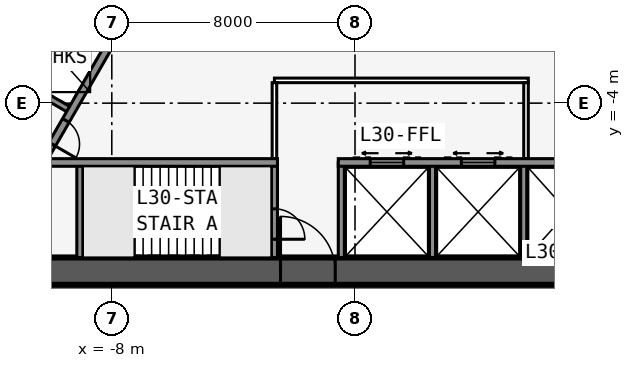
"""IFC4 building model, lengths in metres.
Left out: names, types, materials, properties, quantities, classifications, styles, units other than length and angle.
Written with IfcOpenShell. Run it as: python <this file> out.ifc"""

import sys

from ifc_helpers import new_model, si_unit, direction, frame, frame_2d, origin, place, context, subcontext, project, spatial, rectangle, extrude, element, fill, save


model = new_model("IFC4")
c1 = context("Model", 3, precision=1e-05, world=origin(), true_north=direction((0.0, 1.0)))
c2 = subcontext(c1, "Body", "Model", "MODEL_VIEW")
j1 = project(units=[si_unit("LENGTHUNIT", "METRE"), si_unit("PLANEANGLEUNIT", "RADIAN")], contexts=[c1])
p1 = place(None, origin())
s1 = spatial("IfcSite", under=j1, at=p1, CompositionType="ELEMENT")
p2 = place(p1, origin())
s2 = spatial("IfcBuilding", under=s1, at=p2, CompositionType="ELEMENT")
p3 = place(p2, frame((0.0, 0.0, 118.1)))
s3 = spatial("IfcBuildingStorey", under=s2, at=p3, CompositionType="ELEMENT", Elevation=118.1)
p4 = place(p3, frame((-16.5, -9.526, 0.0), z_axis=(0.0, 0.0, 1.0), x_axis=(1.0, 0.0, 0.0)))
e1 = element("IfcWall", 1, at=p4, inside=s3, PredefinedType="SHEAR", context=c2, shape_type="SweptSolid", body=[
    extrude(rectangle(XDim=33.0, YDim=0.9, at=frame_2d((16.5, 0.0))), origin(), (0.0, 0.0, 1.0), 3.4),
])
p5 = place(p4, frame((14.05, 0.0, 0.0)))
e2 = element("IfcOpeningElement", 2, at=p5, cuts=e1, PredefinedType="OPENING", context=c2, shape_type="SweptSolid", body=[
    extrude(rectangle(XDim=1.8, YDim=2.13, at=frame_2d((0.9, 1.065))), frame((0.0, 0.46, 0.0), z_axis=(0.0, -1.0, 0.0), x_axis=(1.0, 0.0, 0.0)), (0.0, 0.0, 1.0), 0.92),
])
p6 = place(p3, frame((-10.183, -5.951, 0.0), z_axis=(0.0, 0.0, 1.0), x_axis=(1.0, 0.0, 0.0)))
e3 = element("IfcWall", 3, at=p6, inside=s3, PredefinedType="SOLIDWALL", context=c2, shape_type="SweptSolid", body=[
    extrude(rectangle(XDim=7.633, YDim=0.25, at=frame_2d((3.816, 0.0))), origin(), (0.0, 0.0, 1.0), 3.235),
])
p7 = place(p3, frame((-0.55, -5.951, 0.0), z_axis=(0.0, 0.0, 1.0), x_axis=(1.0, 0.0, 0.0)))
e4 = element("IfcWall", 4, at=p7, inside=s3, PredefinedType="SOLIDWALL", context=c2, shape_type="SweptSolid", body=[
    extrude(rectangle(XDim=10.733, YDim=0.25, at=frame_2d((5.366, 0.0))), origin(), (0.0, 0.0, 1.0), 3.235),
])
p8 = place(p7, frame((9.314, 0.0, 0.0)))
e5 = element("IfcOpeningElement", 5, at=p8, cuts=e4, PredefinedType="OPENING", context=c2, shape_type="SweptSolid", body=[
    extrude(rectangle(XDim=0.9, YDim=2.13, at=frame_2d((0.45, 1.065))), frame((0.0, 0.135, 0.0), z_axis=(0.0, -1.0, 0.0), x_axis=(1.0, 0.0, 0.0)), (0.0, 0.0, 1.0), 0.27),
])
p9 = place(p7, frame((1.05, 0.0, 0.0)))
e6 = element("IfcOpeningElement", 6, at=p9, cuts=e4, PredefinedType="OPENING", context=c2, shape_type="SweptSolid", body=[
    extrude(rectangle(XDim=1.1, YDim=2.13, at=frame_2d((0.55, 1.065))), frame((0.0, 0.135, 0.0), z_axis=(0.0, -1.0, 0.0), x_axis=(1.0, 0.0, 0.0)), (0.0, 0.0, 1.0), 0.27),
])
p10 = place(p7, frame((4.05, 0.0, 0.0)))
e7 = element("IfcOpeningElement", 7, at=p10, cuts=e4, PredefinedType="OPENING", context=c2, shape_type="SweptSolid", body=[
    extrude(rectangle(XDim=1.1, YDim=2.13, at=frame_2d((0.55, 1.065))), frame((0.0, 0.135, 0.0), z_axis=(0.0, -1.0, 0.0), x_axis=(1.0, 0.0, 0.0)), (0.0, 0.0, 1.0), 0.27),
])
p11 = place(p3, frame((-9.05, -5.951, 0.0), z_axis=(0.0, 0.0, 1.0), x_axis=(0.0, -1.0, 0.0)))
e8 = element("IfcWall", 8, at=p11, inside=s3, PredefinedType="SOLIDWALL", context=c2, shape_type="SweptSolid", body=[
    extrude(rectangle(XDim=3.125, YDim=0.2, at=frame_2d((1.562, 0.0))), origin(), (0.0, 0.0, 1.0), 3.235),
])
p12 = place(p3, frame((-2.65, -5.951, 0.0), z_axis=(0.0, 0.0, 1.0), x_axis=(0.0, -1.0, 0.0)))
e9 = element("IfcWall", 9, at=p12, inside=s3, PredefinedType="SOLIDWALL", context=c2, shape_type="SweptSolid", body=[
    extrude(rectangle(XDim=3.125, YDim=0.2, at=frame_2d((1.562, 0.0))), origin(), (0.0, 0.0, 1.0), 3.235),
])
p13 = place(p12, frame((1.525, 0.0, 0.0)))
e10 = element("IfcOpeningElement", 10, at=p13, cuts=e9, PredefinedType="OPENING", context=c2, shape_type="SweptSolid", body=[
    extrude(rectangle(XDim=1.0, YDim=2.13, at=frame_2d((0.5, 1.065))), frame((0.0, 0.11, 0.0), z_axis=(0.0, -1.0, 0.0), x_axis=(1.0, 0.0, 0.0)), (0.0, 0.0, 1.0), 0.22),
])
for number, where, z_axis, x_axis in (
    (11, (-0.45, -5.951, 0.0), (0.0, 0.0, 1.0), (0.0, -1.0, 0.0)),
    (12, (2.55, -5.951, 0.0), (0.0, 0.0, 1.0), (0.0, -1.0, 0.0)),
    (13, (5.55, -5.951, 0.0), (0.0, 0.0, 1.0), (0.0, -1.0, 0.0)),
):
    element("IfcWall", number, at=place(p3, frame(where, z_axis=z_axis, x_axis=x_axis)), inside=s3, PredefinedType="SOLIDWALL", context=c2, shape_type="SweptSolid", body=[
        extrude(rectangle(XDim=3.125, YDim=0.2, at=frame_2d((1.562, 0.0))), origin(), (0.0, 0.0, 1.0), 3.235),
    ])
p14 = place(p3, frame((16.5, -9.526, 0.0), z_axis=(0.0, 0.0, 1.0), x_axis=(-0.499999749417, 0.866025548458, 0.0)))
e14 = element("IfcWall", 14, at=p14, inside=s3, PredefinedType="SHEAR", context=c2, shape_type="SweptSolid", body=[
    extrude(rectangle(XDim=33.0, YDim=0.9, at=frame_2d((16.5, 0.0))), origin(), (0.0, 0.0, 1.0), 3.4),
])
p15 = place(p14, frame((14.15, 0.0, 0.0)))
e15 = element("IfcOpeningElement", 15, at=p15, cuts=e14, PredefinedType="OPENING", context=c2, shape_type="SweptSolid", body=[
    extrude(rectangle(XDim=1.8, YDim=2.13, at=frame_2d((0.9, 1.065))), frame((0.0, 0.46, 0.0), z_axis=(0.0, -1.0, 0.0), x_axis=(1.0, 0.0, 0.0)), (0.0, 0.0, 1.0), 0.92),
])
p16 = place(p14, frame((12.6, 0.0, 0.0)))
e16 = element("IfcOpeningElement", 16, at=p16, cuts=e14, PredefinedType="OPENING", context=c2, shape_type="SweptSolid", body=[
    extrude(rectangle(XDim=1.0, YDim=2.13, at=frame_2d((0.5, 1.065))), frame((0.0, 0.46, 0.0), z_axis=(0.0, -1.0, 0.0), x_axis=(1.0, 0.0, 0.0)), (0.0, 0.0, 1.0), 0.92),
])
p17 = place(p3, frame((10.245, -5.843, 0.0), z_axis=(0.0, 0.0, 1.0), x_axis=(-0.499993009313, 0.866029439822, 0.0)))
e17 = element("IfcWall", 17, at=p17, inside=s3, PredefinedType="SOLIDWALL", context=c2, shape_type="SweptSolid", body=[
    extrude(rectangle(XDim=7.733, YDim=0.25, at=frame_2d((3.866, 0.0))), origin(), (0.0, 0.0, 1.0), 3.235),
])
p18 = place(p3, frame((0.0, 19.052, 0.0), z_axis=(0.0, 0.0, 1.0), x_axis=(-0.499999749417, -0.866025548458, 0.0)))
e18 = element("IfcWall", 18, at=p18, inside=s3, PredefinedType="SHEAR", context=c2, shape_type="SweptSolid", body=[
    extrude(rectangle(XDim=33.0, YDim=0.9, at=frame_2d((16.5, 0.0))), origin(), (0.0, 0.0, 1.0), 3.4),
])
p19 = place(p18, frame((14.15, 0.0, 0.0)))
e19 = element("IfcOpeningElement", 19, at=p19, cuts=e18, PredefinedType="OPENING", context=c2, shape_type="SweptSolid", body=[
    extrude(rectangle(XDim=1.8, YDim=2.13, at=frame_2d((0.9, 1.065))), frame((0.0, 0.46, 0.0), z_axis=(0.0, -1.0, 0.0), x_axis=(1.0, 0.0, 0.0)), (0.0, 0.0, 1.0), 0.92),
])
p20 = place(p18, frame((12.6, 0.0, 0.0)))
e20 = element("IfcOpeningElement", 20, at=p20, cuts=e18, PredefinedType="OPENING", context=c2, shape_type="SweptSolid", body=[
    extrude(rectangle(XDim=1.0, YDim=2.13, at=frame_2d((0.5, 1.065))), frame((0.0, 0.46, 0.0), z_axis=(0.0, -1.0, 0.0), x_axis=(1.0, 0.0, 0.0)), (0.0, 0.0, 1.0), 0.92),
])
p21 = place(p3, frame((-4.929, 3.365, 0.0), z_axis=(0.0, 0.0, 1.0), x_axis=(-0.499991433582, -0.866030349552, 0.0)))
e21 = element("IfcWall", 21, at=p21, inside=s3, PredefinedType="SOLIDWALL", context=c2, shape_type="SweptSolid", body=[
    extrude(rectangle(XDim=10.633, YDim=0.25, at=frame_2d((5.316, 0.0))), origin(), (0.0, 0.0, 1.0), 3.235),
])
p22 = place(p21, frame((9.164, 0.0, 0.0)))
e22 = element("IfcOpeningElement", 22, at=p22, cuts=e21, PredefinedType="OPENING", context=c2, shape_type="SweptSolid", body=[
    extrude(rectangle(XDim=0.9, YDim=2.13, at=frame_2d((0.45, 1.065))), frame((0.0, 0.135, 0.0), z_axis=(0.0, -1.0, 0.0), x_axis=(1.0, 0.0, 0.0)), (0.0, 0.0, 1.0), 0.27),
])
p23 = place(p3, frame((-9.329, -4.256, 0.0), z_axis=(0.0, 0.0, 1.0), x_axis=(-0.866022959057, 0.500004234368, 0.0)))
e23 = element("IfcWall", 23, at=p23, inside=s3, PredefinedType="SOLIDWALL", context=c2, shape_type="SweptSolid", body=[
    extrude(rectangle(XDim=3.125, YDim=0.2, at=frame_2d((1.562, 0.0))), origin(), (0.0, 0.0, 1.0), 3.235),
])
p24 = place(p3, frame((20.027, -10.985, 0.0), z_axis=(0.0, 0.0, 1.0), x_axis=(-0.500001677587, 0.866024435227, 0.0)))
e24 = element("IfcWall", 24, at=p24, inside=s3, PredefinedType="PARTITIONING", context=c2, shape_type="SweptSolid", body=[
    extrude(rectangle(XDim=39.054, YDim=0.15, at=frame_2d((19.527, 0.0))), origin(), (0.0, 0.0, 1.0), 3.235),
])
p25 = place(p24, frame((0.352, 0.0, 0.0)))
e25 = element("IfcOpeningElement", 25, at=p25, cuts=e24, PredefinedType="OPENING", context=c2, shape_type="SweptSolid", body=[
    extrude(rectangle(XDim=0.95, YDim=2.13, at=frame_2d((0.475, 1.065))), frame((0.0, 0.085, 0.0), z_axis=(0.0, -1.0, 0.0), x_axis=(1.0, 0.0, 0.0)), (0.0, 0.0, 1.0), 0.17),
])
p26 = place(p24, frame((7.752, 0.0, 0.0)))
e26 = element("IfcOpeningElement", 26, at=p26, cuts=e24, PredefinedType="OPENING", context=c2, shape_type="SweptSolid", body=[
    extrude(rectangle(XDim=0.95, YDim=2.13, at=frame_2d((0.475, 1.065))), frame((0.0, 0.085, 0.0), z_axis=(0.0, -1.0, 0.0), x_axis=(1.0, 0.0, 0.0)), (0.0, 0.0, 1.0), 0.17),
])
p27 = place(p24, frame((17.752, 0.0, 0.0)))
e27 = element("IfcOpeningElement", 27, at=p27, cuts=e24, PredefinedType="OPENING", context=c2, shape_type="SweptSolid", body=[
    extrude(rectangle(XDim=0.95, YDim=2.13, at=frame_2d((0.475, 1.065))), frame((0.0, 0.085, 0.0), z_axis=(0.0, -1.0, 0.0), x_axis=(1.0, 0.0, 0.0)), (0.0, 0.0, 1.0), 0.17),
])
p28 = place(p24, frame((22.152, 0.0, 0.0)))
e28 = element("IfcOpeningElement", 28, at=p28, cuts=e24, PredefinedType="OPENING", context=c2, shape_type="SweptSolid", body=[
    extrude(rectangle(XDim=0.95, YDim=2.13, at=frame_2d((0.475, 1.065))), frame((0.0, 0.085, 0.0), z_axis=(0.0, -1.0, 0.0), x_axis=(1.0, 0.0, 0.0)), (0.0, 0.0, 1.0), 0.17),
])
p29 = place(p24, frame((27.152, 0.0, 0.0)))
e29 = element("IfcOpeningElement", 29, at=p29, cuts=e24, PredefinedType="OPENING", context=c2, shape_type="SweptSolid", body=[
    extrude(rectangle(XDim=0.95, YDim=2.13, at=frame_2d((0.475, 1.065))), frame((0.0, 0.085, 0.0), z_axis=(0.0, -1.0, 0.0), x_axis=(1.0, 0.0, 0.0)), (0.0, 0.0, 1.0), 0.17),
])
p30 = place(p24, frame((36.546, 0.0, 0.0)))
e30 = element("IfcOpeningElement", 30, at=p30, cuts=e24, PredefinedType="OPENING", context=c2, shape_type="SweptSolid", body=[
    extrude(rectangle(XDim=0.95, YDim=2.13, at=frame_2d((0.475, 1.065))), frame((0.0, 0.085, 0.0), z_axis=(0.0, -1.0, 0.0), x_axis=(1.0, 0.0, 0.0)), (0.0, 0.0, 1.0), 0.17),
])
p31 = place(p3, frame((-0.5, 22.836, 0.0), z_axis=(0.0, 0.0, 1.0), x_axis=(-0.500001677587, -0.866024435227, 0.0)))
e31 = element("IfcWall", 31, at=p31, inside=s3, PredefinedType="PARTITIONING", context=c2, shape_type="SweptSolid", body=[
    extrude(rectangle(XDim=39.054, YDim=0.15, at=frame_2d((19.527, 0.0))), origin(), (0.0, 0.0, 1.0), 3.235),
])
p32 = place(p31, frame((0.352, 0.0, 0.0)))
e32 = element("IfcOpeningElement", 32, at=p32, cuts=e31, PredefinedType="OPENING", context=c2, shape_type="SweptSolid", body=[
    extrude(rectangle(XDim=0.95, YDim=2.13, at=frame_2d((0.475, 1.065))), frame((0.0, 0.085, 0.0), z_axis=(0.0, -1.0, 0.0), x_axis=(1.0, 0.0, 0.0)), (0.0, 0.0, 1.0), 0.17),
])
p33 = place(p31, frame((7.152, 0.0, 0.0)))
e33 = element("IfcOpeningElement", 33, at=p33, cuts=e31, PredefinedType="OPENING", context=c2, shape_type="SweptSolid", body=[
    extrude(rectangle(XDim=0.95, YDim=2.13, at=frame_2d((0.475, 1.065))), frame((0.0, 0.085, 0.0), z_axis=(0.0, -1.0, 0.0), x_axis=(1.0, 0.0, 0.0)), (0.0, 0.0, 1.0), 0.17),
])
p34 = place(p31, frame((12.152, 0.0, 0.0)))
e34 = element("IfcOpeningElement", 34, at=p34, cuts=e31, PredefinedType="OPENING", context=c2, shape_type="SweptSolid", body=[
    extrude(rectangle(XDim=0.95, YDim=2.13, at=frame_2d((0.475, 1.065))), frame((0.0, 0.085, 0.0), z_axis=(0.0, -1.0, 0.0), x_axis=(1.0, 0.0, 0.0)), (0.0, 0.0, 1.0), 0.17),
])
p35 = place(p31, frame((17.152, 0.0, 0.0)))
e35 = element("IfcOpeningElement", 35, at=p35, cuts=e31, PredefinedType="OPENING", context=c2, shape_type="SweptSolid", body=[
    extrude(rectangle(XDim=0.95, YDim=2.13, at=frame_2d((0.475, 1.065))), frame((0.0, 0.085, 0.0), z_axis=(0.0, -1.0, 0.0), x_axis=(1.0, 0.0, 0.0)), (0.0, 0.0, 1.0), 0.17),
])
p36 = place(p31, frame((22.752, 0.0, 0.0)))
e36 = element("IfcOpeningElement", 36, at=p36, cuts=e31, PredefinedType="OPENING", context=c2, shape_type="SweptSolid", body=[
    extrude(rectangle(XDim=0.95, YDim=2.13, at=frame_2d((0.475, 1.065))), frame((0.0, 0.085, 0.0), z_axis=(0.0, -1.0, 0.0), x_axis=(1.0, 0.0, 0.0)), (0.0, 0.0, 1.0), 0.17),
])
p37 = place(p31, frame((32.152, 0.0, 0.0)))
e37 = element("IfcOpeningElement", 37, at=p37, cuts=e31, PredefinedType="OPENING", context=c2, shape_type="SweptSolid", body=[
    extrude(rectangle(XDim=0.95, YDim=2.13, at=frame_2d((0.475, 1.065))), frame((0.0, 0.085, 0.0), z_axis=(0.0, -1.0, 0.0), x_axis=(1.0, 0.0, 0.0)), (0.0, 0.0, 1.0), 0.17),
])
p38 = place(p31, frame((37.752, 0.0, 0.0)))
e38 = element("IfcOpeningElement", 38, at=p38, cuts=e31, PredefinedType="OPENING", context=c2, shape_type="SweptSolid", body=[
    extrude(rectangle(XDim=0.95, YDim=2.13, at=frame_2d((0.475, 1.065))), frame((0.0, 0.085, 0.0), z_axis=(0.0, -1.0, 0.0), x_axis=(1.0, 0.0, 0.0)), (0.0, 0.0, 1.0), 0.17),
])
p39 = place(p3, frame((-2.65, -3.251, 0.0), z_axis=(0.0, 0.0, 1.0), x_axis=(1.0, 0.0, 0.0)))
e39 = element("IfcWall", 39, at=p39, inside=s3, PredefinedType="PARTITIONING", context=c2, shape_type="SweptSolid", body=[
    extrude(rectangle(XDim=8.35, YDim=0.15, at=frame_2d((4.175, 0.0))), origin(), (0.0, 0.0, 1.0), 3.235),
])
for number, where, z_axis, x_axis in (
    (40, (-2.65, -5.826, 0.0), (0.0, 0.0, 1.0), (0.0, 1.0, 0.0)),
    (41, (5.625, -5.826, 0.0), (0.0, 0.0, 1.0), (0.0, 1.0, 0.0)),
):
    element("IfcWall", number, at=place(p3, frame(where, z_axis=z_axis, x_axis=x_axis)), inside=s3, PredefinedType="PARTITIONING", context=c2, shape_type="SweptSolid", body=[
        extrude(rectangle(XDim=2.5, YDim=0.15, at=frame_2d((1.25, 0.0))), origin(), (0.0, 0.0, 1.0), 3.235),
    ])
p40 = place(p3, frame((-7.247, -7.576, 0.0), z_axis=(0.0, 0.0, 1.0), x_axis=(1.0, 0.0, 0.0)))
e42 = element("IfcWall", 42, at=p40, inside=s3, PredefinedType="SOLIDWALL", context=c2, shape_type="SweptSolid", body=[
    extrude(rectangle(XDim=2.794, YDim=0.1, at=frame_2d((1.397, 0.0))), origin(), (0.0, 0.0, 1.0), 3.4),
])
p41 = place(p5, origin())
e43 = element("IfcDoor", 43, at=p41, inside=s3, OperationType="DOUBLE_DOOR_SINGLE_SWING", PredefinedType="DOOR", context=c2, shape_type="SweptSolid", body=[
    extrude(rectangle(XDim=1.8, YDim=2.13, at=frame_2d((0.9, 1.065))), frame((0.0, 0.025, 0.0), z_axis=(0.0, -1.0, 0.0), x_axis=(1.0, 0.0, 0.0)), (0.0, 0.0, 1.0), 0.05),
])
fill(e2, e43)
p42 = place(p13, origin())
e44 = element("IfcDoor", 44, at=p42, inside=s3, OperationType="SINGLE_SWING_RIGHT", PredefinedType="DOOR", context=c2, shape_type="SweptSolid", body=[
    extrude(rectangle(XDim=1.0, YDim=2.13, at=frame_2d((0.5, 1.065))), frame((0.0, 0.025, 0.0), z_axis=(0.0, -1.0, 0.0), x_axis=(1.0, 0.0, 0.0)), (0.0, 0.0, 1.0), 0.05),
])
fill(e10, e44)
p43 = place(p22, origin())
e45 = element("IfcDoor", 45, at=p43, inside=s3, OperationType="SINGLE_SWING_RIGHT", PredefinedType="DOOR", context=c2, shape_type="SweptSolid", body=[
    extrude(rectangle(XDim=0.9, YDim=2.13, at=frame_2d((0.45, 1.065))), frame((0.0, 0.025, 0.0), z_axis=(0.0, -1.0, 0.0), x_axis=(1.0, 0.0, 0.0)), (0.0, 0.0, 1.0), 0.05),
])
fill(e22, e45)
p44 = place(p9, origin())
e46 = element("IfcDoor", 46, at=p44, inside=s3, OperationType="DOUBLE_DOOR_SLIDING", PredefinedType="USERDEFINED", context=c2, shape_type="SweptSolid", body=[
    extrude(rectangle(XDim=1.1, YDim=2.13, at=frame_2d((0.55, 1.065))), frame((0.0, 0.025, 0.0), z_axis=(0.0, -1.0, 0.0), x_axis=(1.0, 0.0, 0.0)), (0.0, 0.0, 1.0), 0.05),
])
fill(e6, e46)
p45 = place(p10, origin())
e47 = element("IfcDoor", 47, at=p45, inside=s3, OperationType="DOUBLE_DOOR_SLIDING", PredefinedType="USERDEFINED", context=c2, shape_type="SweptSolid", body=[
    extrude(rectangle(XDim=1.1, YDim=2.13, at=frame_2d((0.55, 1.065))), frame((0.0, 0.025, 0.0), z_axis=(0.0, -1.0, 0.0), x_axis=(1.0, 0.0, 0.0)), (0.0, 0.0, 1.0), 0.05),
])
fill(e7, e47)
save(model, sys.argv[1])
